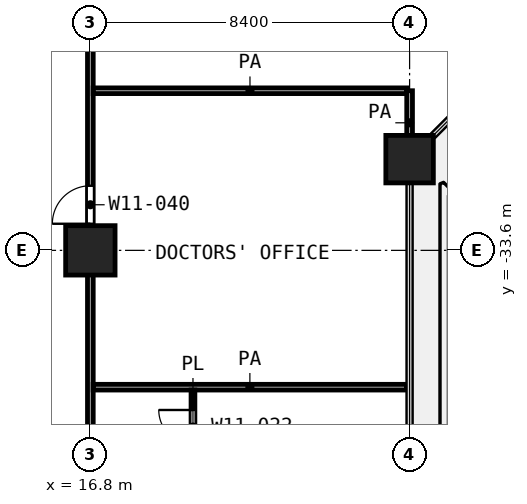
"""IFC4 building model, lengths in metres.
Left out: names, types, materials, properties, quantities, classifications, styles, units other than length and angle.
Written with IfcOpenShell. Run it as: python <this file> out.ifc"""

import sys

from ifc_helpers import new_model, si_unit, direction, frame, frame_2d, origin, origin_2d, place, context, subcontext, project, spatial, rectangle, extrude, element, fill, save


model = new_model("IFC4")
c1 = context("Model", 3, precision=1e-05, world=origin(), true_north=direction((0.0, 1.0)))
c2 = subcontext(c1, "Body", "Model", "MODEL_VIEW")
j1 = project(units=[si_unit("LENGTHUNIT", "METRE"), si_unit("PLANEANGLEUNIT", "RADIAN")], contexts=[c1])
p1 = place(None, origin())
s1 = spatial("IfcSite", under=j1, at=p1, CompositionType="ELEMENT")
p2 = place(p1, origin())
s2 = spatial("IfcBuilding", under=s1, at=p2, CompositionType="ELEMENT")
p3 = place(p2, frame((0.0, 0.0, 51.8)))
s3 = spatial("IfcBuildingStorey", under=s2, at=p3, CompositionType="ELEMENT", Elevation=51.8)
p4 = place(p3, frame((25.2, -31.2, 0.0), z_axis=(0.0, 0.0, 1.0), x_axis=(1.0, 0.0, 0.0)))
e1 = element("IfcColumn", 1, at=p4, inside=s3, PredefinedType="COLUMN", context=c2, shape_type="SweptSolid", body=[
    extrude(rectangle(XDim=1.25, YDim=1.25, at=origin_2d()), origin(), (0.0, 0.0, 1.0), 4.2),
])
p5 = place(p3, frame((16.8, -33.6, 0.0), z_axis=(0.0, 0.0, 1.0), x_axis=(1.0, 0.0, 0.0)))
e2 = element("IfcColumn", 2, at=p5, inside=s3, PredefinedType="COLUMN", context=c2, shape_type="SweptSolid", body=[
    extrude(rectangle(XDim=1.3, YDim=1.3, at=origin_2d()), origin(), (0.0, 0.0, 1.0), 4.2),
])
p6 = place(p3, frame((19.5, -39.3, 0.0), z_axis=(0.0, 0.0, 1.0), x_axis=(0.0, 1.0, 0.0)))
e3 = element("IfcWall", 3, at=p6, inside=s3, PredefinedType="PARTITIONING", context=c2, shape_type="SweptSolid", body=[
    extrude(rectangle(XDim=2.025, YDim=0.1, at=frame_2d((1.013, 0.0))), origin(), (0.0, 0.0, 1.0), 3.9),
])
p7 = place(p6, frame((0.6, 0.0, 0.0)))
e4 = element("IfcOpeningElement", 4, at=p7, cuts=e3, PredefinedType="OPENING", context=c2, shape_type="SweptSolid", body=[
    extrude(rectangle(XDim=0.9, YDim=2.1, at=frame_2d((0.45, 1.05))), frame((0.0, 0.06, 0.0), z_axis=(0.0, -1.0, 0.0), x_axis=(1.0, 0.0, 0.0)), (0.0, 0.0, 1.0), 0.12),
])
p8 = place(p3, frame((16.875, -37.2, 0.0), z_axis=(0.0, 0.0, 1.0), x_axis=(1.0, 0.0, 0.0)))
e5 = element("IfcWall", 5, at=p8, inside=s3, PredefinedType="PARTITIONING", context=c2, shape_type="SweptSolid", body=[
    extrude(rectangle(XDim=8.245, YDim=0.15, at=frame_2d((4.123, 0.0))), origin(), (0.0, 0.0, 1.0), 3.9),
])
p9 = place(p3, frame((16.875, -29.4, 0.0), z_axis=(0.0, 0.0, 1.0), x_axis=(1.0, 0.0, 0.0)))
e6 = element("IfcWall", 6, at=p9, inside=s3, PredefinedType="PARTITIONING", context=c2, shape_type="SweptSolid", body=[
    extrude(rectangle(XDim=8.25, YDim=0.15, at=frame_2d((4.125, 0.0))), origin(), (0.0, 0.0, 1.0), 3.9),
])
p10 = place(p3, frame((16.8, -71.32, 0.0), z_axis=(0.0, 0.0, 1.0), x_axis=(0.0, 1.0, 0.0)))
e7 = element("IfcWall", 7, at=p10, inside=s3, PredefinedType="PARTITIONING", context=c2, shape_type="SweptSolid", body=[
    extrude(rectangle(XDim=46.22, YDim=0.15, at=frame_2d((23.11, 0.0))), origin(), (0.0, 0.0, 1.0), 3.9),
])
p11 = place(p10, frame((38.42, 0.0, 0.0)))
e8 = element("IfcOpeningElement", 8, at=p11, cuts=e7, PredefinedType="OPENING", context=c2, shape_type="SweptSolid", body=[
    extrude(rectangle(XDim=1.0, YDim=2.1, at=frame_2d((0.5, 1.05))), frame((0.0, 0.085, 0.0), z_axis=(0.0, -1.0, 0.0), x_axis=(1.0, 0.0, 0.0)), (0.0, 0.0, 1.0), 0.17),
])
p12 = place(p10, frame((30.22, 0.0, 0.0)))
e9 = element("IfcOpeningElement", 9, at=p12, cuts=e7, PredefinedType="OPENING", context=c2, shape_type="SweptSolid", body=[
    extrude(rectangle(XDim=1.2, YDim=2.1, at=frame_2d((0.6, 1.05))), frame((0.0, 0.085, 0.0), z_axis=(0.0, -1.0, 0.0), x_axis=(1.0, 0.0, 0.0)), (0.0, 0.0, 1.0), 0.17),
])
p13 = place(p10, frame((27.42, 0.0, 0.0)))
e10 = element("IfcOpeningElement", 10, at=p13, cuts=e7, PredefinedType="OPENING", context=c2, shape_type="SweptSolid", body=[
    extrude(rectangle(XDim=1.2, YDim=2.1, at=frame_2d((0.6, 1.05))), frame((0.0, 0.085, 0.0), z_axis=(0.0, -1.0, 0.0), x_axis=(1.0, 0.0, 0.0)), (0.0, 0.0, 1.0), 0.17),
])
p14 = place(p10, frame((25.57, 0.0, 0.0)))
e11 = element("IfcOpeningElement", 11, at=p14, cuts=e7, PredefinedType="OPENING", context=c2, shape_type="SweptSolid", body=[
    extrude(rectangle(XDim=1.2, YDim=2.1, at=frame_2d((0.6, 1.05))), frame((0.0, 0.085, 0.0), z_axis=(0.0, -1.0, 0.0), x_axis=(1.0, 0.0, 0.0)), (0.0, 0.0, 1.0), 0.17),
])
p15 = place(p10, frame((21.62, 0.0, 0.0)))
e12 = element("IfcOpeningElement", 12, at=p15, cuts=e7, PredefinedType="OPENING", context=c2, shape_type="SweptSolid", body=[
    extrude(rectangle(XDim=1.2, YDim=2.1, at=frame_2d((0.6, 1.05))), frame((0.0, 0.085, 0.0), z_axis=(0.0, -1.0, 0.0), x_axis=(1.0, 0.0, 0.0)), (0.0, 0.0, 1.0), 0.17),
])
p16 = place(p10, frame((14.32, 0.0, 0.0)))
e13 = element("IfcOpeningElement", 13, at=p16, cuts=e7, PredefinedType="OPENING", context=c2, shape_type="SweptSolid", body=[
    extrude(rectangle(XDim=1.2, YDim=2.1, at=frame_2d((0.6, 1.05))), frame((0.0, 0.085, 0.0), z_axis=(0.0, -1.0, 0.0), x_axis=(1.0, 0.0, 0.0)), (0.0, 0.0, 1.0), 0.17),
])
p17 = place(p10, frame((18.52, 0.0, 0.0)))
e14 = element("IfcOpeningElement", 14, at=p17, cuts=e7, PredefinedType="OPENING", context=c2, shape_type="SweptSolid", body=[
    extrude(rectangle(XDim=1.2, YDim=2.1, at=frame_2d((0.6, 1.05))), frame((0.0, 0.085, 0.0), z_axis=(0.0, -1.0, 0.0), x_axis=(1.0, 0.0, 0.0)), (0.0, 0.0, 1.0), 0.17),
])
p18 = place(p10, frame((10.92, 0.0, 0.0)))
e15 = element("IfcOpeningElement", 15, at=p18, cuts=e7, PredefinedType="OPENING", context=c2, shape_type="SweptSolid", body=[
    extrude(rectangle(XDim=0.9, YDim=2.1, at=frame_2d((0.45, 1.05))), frame((0.0, 0.085, 0.0), z_axis=(0.0, -1.0, 0.0), x_axis=(1.0, 0.0, 0.0)), (0.0, 0.0, 1.0), 0.17),
])
p19 = place(p10, frame((4.82, 0.0, 0.0)))
e16 = element("IfcOpeningElement", 16, at=p19, cuts=e7, PredefinedType="OPENING", context=c2, shape_type="SweptSolid", body=[
    extrude(rectangle(XDim=1.5, YDim=2.1, at=frame_2d((0.75, 1.05))), frame((0.0, 0.085, 0.0), z_axis=(0.0, -1.0, 0.0), x_axis=(1.0, 0.0, 0.0)), (0.0, 0.0, 1.0), 0.17),
])
p20 = place(p3, frame((25.2, -31.087, 0.0), z_axis=(0.0, 0.0, 1.0), x_axis=(0.0, 1.0, 0.0)))
e17 = element("IfcWall", 17, at=p20, inside=s3, PredefinedType="PARTITIONING", context=c2, shape_type="SweptSolid", body=[
    extrude(rectangle(XDim=1.687, YDim=0.15, at=frame_2d((0.844, 0.0))), origin(), (0.0, 0.0, 1.0), 3.9),
])
p21 = place(p11, origin())
e18 = element("IfcDoor", 18, at=p21, inside=s3, OperationType="SINGLE_SWING_LEFT", PredefinedType="DOOR", context=c2, shape_type="SweptSolid", body=[
    extrude(rectangle(XDim=1.0, YDim=2.1, at=frame_2d((0.5, 1.05))), frame((0.0, 0.025, 0.0), z_axis=(0.0, -1.0, 0.0), x_axis=(1.0, 0.0, 0.0)), (0.0, 0.0, 1.0), 0.05),
])
fill(e8, e18)
p22 = place(p7, origin())
e19 = element("IfcDoor", 19, at=p22, inside=s3, OperationType="SINGLE_SWING_RIGHT", PredefinedType="DOOR", context=c2, shape_type="SweptSolid", body=[
    extrude(rectangle(XDim=0.9, YDim=2.1, at=frame_2d((0.45, 1.05))), frame((0.0, 0.025, 0.0), z_axis=(0.0, -1.0, 0.0), x_axis=(1.0, 0.0, 0.0)), (0.0, 0.0, 1.0), 0.05),
])
fill(e4, e19)
save(model, sys.argv[1])
